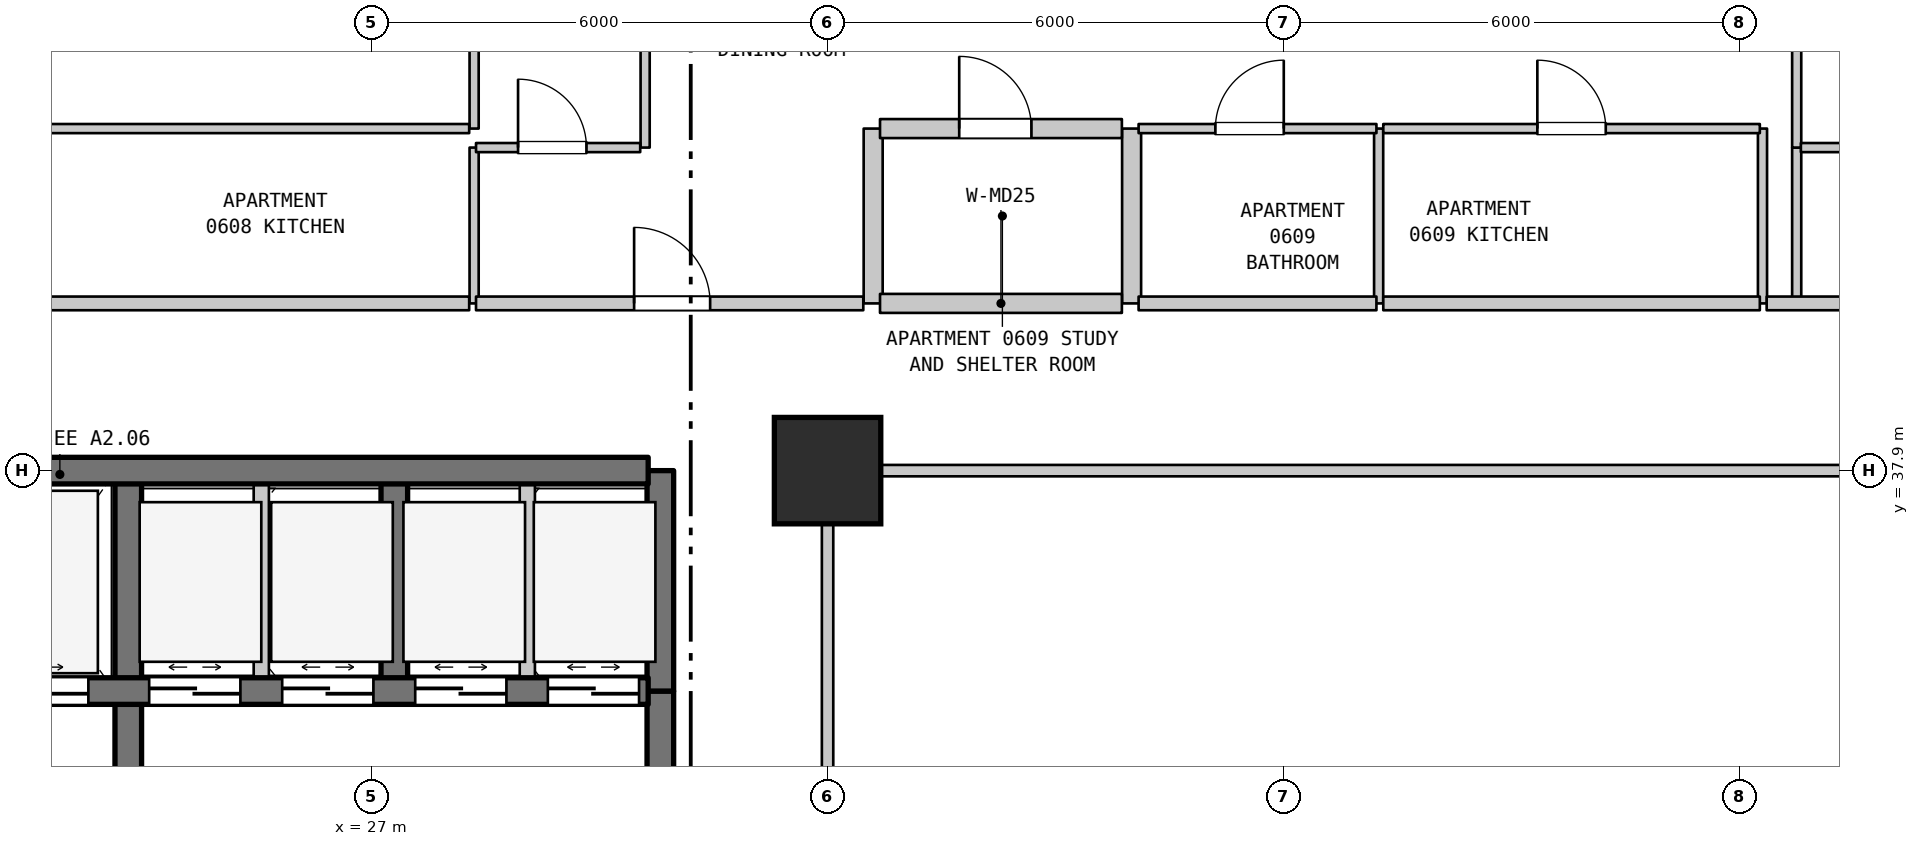
"""IFC4 building model, lengths in metres.
Left out: names, types, materials, properties, quantities, classifications, styles, units other than length and angle.
Written with IfcOpenShell. Run it as: python <this file> out.ifc"""

import sys

from ifc_helpers import new_model, si_unit, direction, frame, frame_2d, origin, origin_2d, place, context, subcontext, project, spatial, rectangle, extrude, element, fill, save


model = new_model("IFC4")
c1 = context("Model", 3, precision=1e-05, world=origin(), true_north=direction((0.0, 1.0)))
c2 = subcontext(c1, "Body", "Model", "MODEL_VIEW")
j1 = project(units=[si_unit("LENGTHUNIT", "METRE"), si_unit("PLANEANGLEUNIT", "RADIAN")], contexts=[c1])
p1 = place(None, origin())
s1 = spatial("IfcSite", under=j1, at=p1, CompositionType="ELEMENT")
p2 = place(p1, origin())
s2 = spatial("IfcBuilding", under=s1, at=p2, CompositionType="ELEMENT")
p3 = place(p2, frame((0.0, 0.0, 31.4)))
s3 = spatial("IfcBuildingStorey", under=s2, at=p3, CompositionType="ELEMENT", Elevation=31.4)
p4 = place(p3, frame((33.0, 37.9, 0.0), z_axis=(0.0, 0.0, 1.0), x_axis=(1.0, 0.0, 0.0)))
e1 = element("IfcColumn", 1, at=p4, inside=s3, PredefinedType="COLUMN", context=c2, shape_type="SweptSolid", body=[
    extrude(rectangle(XDim=1.4, YDim=1.4, at=origin_2d()), origin(), (0.0, 0.0, 1.0), 3.7),
])
p5 = place(p3, frame((23.8, 31.5, 0.0), z_axis=(0.0, 0.0, 1.0), x_axis=(0.0, 1.0, 0.0)))
e2 = element("IfcWall", 2, at=p5, inside=s3, PredefinedType="SHEAR", context=c2, shape_type="SweptSolid", body=[
    extrude(rectangle(XDim=3.5, YDim=0.35, at=frame_2d((1.75, 0.0))), origin(), (0.0, 0.0, 1.0), 3.385),
])
p6 = place(p5, frame((1.127, 0.0, 0.0)))
e3 = element("IfcOpeningElement", 3, at=p6, cuts=e2, PredefinedType="OPENING", context=c2, shape_type="SweptSolid", body=[
    extrude(rectangle(XDim=1.1, YDim=2.15, at=frame_2d((0.55, 1.075))), frame((0.0, 0.185, 0.0), z_axis=(0.0, -1.0, 0.0), x_axis=(1.0, 0.0, 0.0)), (0.0, 0.0, 1.0), 0.37),
])
p7 = place(p3, frame((23.8, 35.0, 0.0), z_axis=(0.0, 0.0, 1.0), x_axis=(0.0, 1.0, 0.0)))
e4 = element("IfcWall", 4, at=p7, inside=s3, PredefinedType="SHEAR", context=c2, shape_type="SweptSolid", body=[
    extrude(rectangle(XDim=2.9, YDim=0.35, at=frame_2d((1.45, 0.0))), origin(), (0.0, 0.0, 1.0), 3.385),
])
p8 = place(p3, frame((25.55, 35.0, 0.0), z_axis=(0.0, 0.0, 1.0), x_axis=(0.0, 1.0, 0.0)))
e5 = element("IfcWall", 5, at=p8, inside=s3, PredefinedType="STANDARD", context=c2, shape_type="SweptSolid", body=[
    extrude(rectangle(XDim=2.9, YDim=0.2, at=frame_2d((1.45, 0.0))), origin(), (0.0, 0.0, 1.0), 3.385),
])
p9 = place(p3, frame((27.3, 35.0, 0.0), z_axis=(0.0, 0.0, 1.0), x_axis=(0.0, 1.0, 0.0)))
e6 = element("IfcWall", 6, at=p9, inside=s3, PredefinedType="SHEAR", context=c2, shape_type="SweptSolid", body=[
    extrude(rectangle(XDim=2.9, YDim=0.35, at=frame_2d((1.45, 0.0))), origin(), (0.0, 0.0, 1.0), 3.385),
])
p10 = place(p3, frame((28.35, 40.1, 0.0), z_axis=(0.0, 0.0, 1.0), x_axis=(0.0, 1.0, 0.0)))
e7 = element("IfcWall", 7, at=p10, inside=s3, PredefinedType="PARTITIONING", context=c2, shape_type="SweptSolid", body=[
    extrude(rectangle(XDim=2.05, YDim=0.12, at=frame_2d((1.025, 0.0))), origin(), (0.0, 0.0, 1.0), 3.385),
])
p11 = place(p3, frame((28.35, 42.4, 0.0), z_axis=(0.0, 0.0, 1.0), x_axis=(0.0, 1.0, 0.0)))
e8 = element("IfcWall", 8, at=p11, inside=s3, PredefinedType="PARTITIONING", context=c2, shape_type="SweptSolid", body=[
    extrude(rectangle(XDim=2.7, YDim=0.12, at=frame_2d((1.35, 0.0))), origin(), (0.0, 0.0, 1.0), 3.385),
])
p12 = place(p3, frame((29.05, 35.0, 0.0), z_axis=(0.0, 0.0, 1.0), x_axis=(0.0, 1.0, 0.0)))
e9 = element("IfcWall", 9, at=p12, inside=s3, PredefinedType="STANDARD", context=c2, shape_type="SweptSolid", body=[
    extrude(rectangle(XDim=2.9, YDim=0.2, at=frame_2d((1.45, 0.0))), origin(), (0.0, 0.0, 1.0), 3.385),
])
p13 = place(p3, frame((30.6, 42.15, 0.0), z_axis=(0.0, 0.0, 1.0), x_axis=(0.0, 1.0, 0.0)))
e10 = element("IfcWall", 10, at=p13, inside=s3, PredefinedType="PARTITIONING", context=c2, shape_type="SweptSolid", body=[
    extrude(rectangle(XDim=11.74, YDim=0.12, at=frame_2d((5.87, 0.0))), origin(), (0.0, 0.0, 1.0), 3.385),
])
p14 = place(p3, frame((30.8, 31.5, 0.0), z_axis=(0.0, 0.0, 1.0), x_axis=(0.0, 1.0, 0.0)))
e11 = element("IfcWall", 11, at=p14, inside=s3, PredefinedType="SHEAR", context=c2, shape_type="SweptSolid", body=[
    extrude(rectangle(XDim=3.5, YDim=0.35, at=frame_2d((1.75, 0.0))), origin(), (0.0, 0.0, 1.0), 3.385),
])
p15 = place(p14, frame((1.15, 0.0, 0.0)))
e12 = element("IfcOpeningElement", 12, at=p15, cuts=e11, PredefinedType="OPENING", context=c2, shape_type="SweptSolid", body=[
    extrude(rectangle(XDim=1.2, YDim=2.2, at=frame_2d((0.6, 1.1))), frame((0.0, 0.185, 0.0), z_axis=(0.0, -1.0, 0.0), x_axis=(1.0, 0.0, 0.0)), (0.0, 0.0, 1.0), 0.37),
])
p16 = place(p3, frame((30.8, 35.0, 0.0), z_axis=(0.0, 0.0, 1.0), x_axis=(0.0, 1.0, 0.0)))
e13 = element("IfcWall", 13, at=p16, inside=s3, PredefinedType="SHEAR", context=c2, shape_type="SweptSolid", body=[
    extrude(rectangle(XDim=2.9, YDim=0.35, at=frame_2d((1.45, 0.0))), origin(), (0.0, 0.0, 1.0), 3.385),
])
p17 = place(p3, frame((33.0, 27.91, 0.0), z_axis=(0.0, 0.0, 1.0), x_axis=(0.0, 1.0, 0.0)))
e14 = element("IfcWall", 14, at=p17, inside=s3, PredefinedType="STANDARD", context=c2, shape_type="SweptSolid", body=[
    extrude(rectangle(XDim=9.98, YDim=0.15, at=frame_2d((4.99, 0.0))), origin(), (0.0, 0.0, 1.0), 2.885),
])
for number, where, z_axis, x_axis in (
    (15, (33.6, 40.1, 0.0), (0.0, 0.0, 1.0), (0.0, 1.0, 0.0)),
    (16, (37.0, 40.1, 0.0), (0.0, 0.0, 1.0), (0.0, 1.0, 0.0)),
):
    element("IfcWall", number, at=place(p3, frame(where, z_axis=z_axis, x_axis=x_axis)), inside=s3, PredefinedType="STANDARD", context=c2, shape_type="SweptSolid", body=[
        extrude(rectangle(XDim=2.3, YDim=0.25, at=frame_2d((1.15, 0.0))), origin(), (0.0, 0.0, 1.0), 3.385),
    ])
for number, where, z_axis, x_axis in (
    (17, (40.25, 40.1, 0.0), (0.0, 0.0, 1.0), (0.0, 1.0, 0.0)),
    (18, (45.3, 40.1, 0.0), (0.0, 0.0, 1.0), (0.0, 1.0, 0.0)),
):
    element("IfcWall", number, at=place(p3, frame(where, z_axis=z_axis, x_axis=x_axis)), inside=s3, PredefinedType="PARTITIONING", context=c2, shape_type="SweptSolid", body=[
        extrude(rectangle(XDim=2.3, YDim=0.12, at=frame_2d((1.15, 0.0))), origin(), (0.0, 0.0, 1.0), 3.385),
    ])
p18 = place(p3, frame((45.75, 40.1, 0.0), z_axis=(0.0, 0.0, 1.0), x_axis=(0.0, 1.0, 0.0)))
e19 = element("IfcWall", 19, at=p18, inside=s3, PredefinedType="PARTITIONING", context=c2, shape_type="SweptSolid", body=[
    extrude(rectangle(XDim=2.05, YDim=0.12, at=frame_2d((1.025, 0.0))), origin(), (0.0, 0.0, 1.0), 3.385),
])
p19 = place(p3, frame((45.75, 42.15, 0.0), z_axis=(0.0, 0.0, 1.0), x_axis=(0.0, 1.0, 0.0)))
e20 = element("IfcWall", 20, at=p19, inside=s3, PredefinedType="PARTITIONING", context=c2, shape_type="SweptSolid", body=[
    extrude(rectangle(XDim=3.3, YDim=0.12, at=frame_2d((1.65, 0.0))), origin(), (0.0, 0.0, 1.0), 3.385),
])
p20 = place(p3, frame((19.16, 35.0, 0.0), z_axis=(0.0, 0.0, 1.0), x_axis=(1.0, 0.0, 0.0)))
e21 = element("IfcWall", 21, at=p20, inside=s3, PredefinedType="SHEAR", context=c2, shape_type="SweptSolid", body=[
    extrude(rectangle(XDim=11.48, YDim=0.35, at=frame_2d((5.74, 0.0))), origin(), (0.0, 0.0, 1.0), 3.385),
])
p21 = place(p20, frame((0.365, 0.0, 0.0)))
e22 = element("IfcOpeningElement", 22, at=p21, cuts=e21, PredefinedType="OPENING", context=c2, shape_type="SweptSolid", body=[
    extrude(rectangle(XDim=1.35, YDim=2.2, at=frame_2d((0.675, 1.1))), frame((0.0, 0.185, 0.0), z_axis=(0.0, -1.0, 0.0), x_axis=(1.0, 0.0, 0.0)), (0.0, 0.0, 1.0), 0.37),
])
p22 = place(p20, frame((2.765, 0.0, 0.0)))
e23 = element("IfcOpeningElement", 23, at=p22, cuts=e21, PredefinedType="OPENING", context=c2, shape_type="SweptSolid", body=[
    extrude(rectangle(XDim=1.35, YDim=2.2, at=frame_2d((0.675, 1.1))), frame((0.0, 0.185, 0.0), z_axis=(0.0, -1.0, 0.0), x_axis=(1.0, 0.0, 0.0)), (0.0, 0.0, 1.0), 0.37),
])
p23 = place(p20, frame((4.915, 0.0, 0.0)))
e24 = element("IfcOpeningElement", 24, at=p23, cuts=e21, PredefinedType="OPENING", context=c2, shape_type="SweptSolid", body=[
    extrude(rectangle(XDim=1.2, YDim=2.2, at=frame_2d((0.6, 1.1))), frame((0.0, 0.185, 0.0), z_axis=(0.0, -1.0, 0.0), x_axis=(1.0, 0.0, 0.0)), (0.0, 0.0, 1.0), 0.37),
])
p24 = place(p20, frame((6.665, 0.0, 0.0)))
e25 = element("IfcOpeningElement", 25, at=p24, cuts=e21, PredefinedType="OPENING", context=c2, shape_type="SweptSolid", body=[
    extrude(rectangle(XDim=1.2, YDim=2.2, at=frame_2d((0.6, 1.1))), frame((0.0, 0.185, 0.0), z_axis=(0.0, -1.0, 0.0), x_axis=(1.0, 0.0, 0.0)), (0.0, 0.0, 1.0), 0.37),
])
p25 = place(p20, frame((8.415, 0.0, 0.0)))
e26 = element("IfcOpeningElement", 26, at=p25, cuts=e21, PredefinedType="OPENING", context=c2, shape_type="SweptSolid", body=[
    extrude(rectangle(XDim=1.2, YDim=2.2, at=frame_2d((0.6, 1.1))), frame((0.0, 0.185, 0.0), z_axis=(0.0, -1.0, 0.0), x_axis=(1.0, 0.0, 0.0)), (0.0, 0.0, 1.0), 0.37),
])
p26 = place(p20, frame((10.16, 0.0, 0.0)))
e27 = element("IfcOpeningElement", 27, at=p26, cuts=e21, PredefinedType="OPENING", context=c2, shape_type="SweptSolid", body=[
    extrude(rectangle(XDim=1.2, YDim=2.2, at=frame_2d((0.6, 1.1))), frame((0.0, 0.185, 0.0), z_axis=(0.0, -1.0, 0.0), x_axis=(1.0, 0.0, 0.0)), (0.0, 0.0, 1.0), 0.37),
])
p27 = place(p3, frame((19.16, 37.9, 0.0), z_axis=(0.0, 0.0, 1.0), x_axis=(1.0, 0.0, 0.0)))
e28 = element("IfcWall", 28, at=p27, inside=s3, PredefinedType="SHEAR", context=c2, shape_type="SweptSolid", body=[
    extrude(rectangle(XDim=11.48, YDim=0.35, at=frame_2d((5.74, 0.0))), origin(), (0.0, 0.0, 1.0), 3.385),
])
p28 = place(p3, frame((33.07, 37.9, 0.0), z_axis=(0.0, 0.0, 1.0), x_axis=(1.0, 0.0, 0.0)))
e29 = element("IfcWall", 29, at=p28, inside=s3, PredefinedType="STANDARD", context=c2, shape_type="SweptSolid", body=[
    extrude(rectangle(XDim=26.935, YDim=0.15, at=frame_2d((13.467, 0.0))), origin(), (0.0, 0.0, 1.0), 3.385),
])
p29 = place(p3, frame((22.695, 40.1, 0.0), z_axis=(0.0, 0.0, 1.0), x_axis=(1.0, 0.0, 0.0)))
e30 = element("IfcWall", 30, at=p29, inside=s3, PredefinedType="STANDARD", context=c2, shape_type="SweptSolid", body=[
    extrude(rectangle(XDim=5.59, YDim=0.18, at=frame_2d((2.795, 0.0))), origin(), (0.0, 0.0, 1.0), 3.385),
])
p30 = place(p3, frame((28.375, 40.1, 0.0), z_axis=(0.0, 0.0, 1.0), x_axis=(1.0, 0.0, 0.0)))
e31 = element("IfcWall", 31, at=p30, inside=s3, PredefinedType="STANDARD", context=c2, shape_type="SweptSolid", body=[
    extrude(rectangle(XDim=5.095, YDim=0.18, at=frame_2d((2.547, 0.0))), origin(), (0.0, 0.0, 1.0), 3.385),
])
p31 = place(p30, frame((2.08, 0.0, 0.0)))
e32 = element("IfcOpeningElement", 32, at=p31, cuts=e31, PredefinedType="OPENING", context=c2, shape_type="SweptSolid", body=[
    extrude(rectangle(XDim=1.0, YDim=2.15, at=frame_2d((0.5, 1.075))), frame((0.0, 0.1, 0.0), z_axis=(0.0, -1.0, 0.0), x_axis=(1.0, 0.0, 0.0)), (0.0, 0.0, 1.0), 0.2),
])
p32 = place(p3, frame((33.69, 40.1, 0.0), z_axis=(0.0, 0.0, 1.0), x_axis=(1.0, 0.0, 0.0)))
e33 = element("IfcWall", 33, at=p32, inside=s3, PredefinedType="STANDARD", context=c2, shape_type="SweptSolid", body=[
    extrude(rectangle(XDim=3.182, YDim=0.25, at=frame_2d((1.591, 0.0))), origin(), (0.0, 0.0, 1.0), 3.385),
])
p33 = place(p3, frame((37.092, 40.1, 0.0), z_axis=(0.0, 0.0, 1.0), x_axis=(1.0, 0.0, 0.0)))
e34 = element("IfcWall", 34, at=p33, inside=s3, PredefinedType="STANDARD", context=c2, shape_type="SweptSolid", body=[
    extrude(rectangle(XDim=3.129, YDim=0.18, at=frame_2d((1.564, 0.0))), origin(), (0.0, 0.0, 1.0), 3.385),
])
p34 = place(p3, frame((40.311, 40.1, 0.0), z_axis=(0.0, 0.0, 1.0), x_axis=(1.0, 0.0, 0.0)))
e35 = element("IfcWall", 35, at=p34, inside=s3, PredefinedType="STANDARD", context=c2, shape_type="SweptSolid", body=[
    extrude(rectangle(XDim=4.954, YDim=0.18, at=frame_2d((2.477, 0.0))), origin(), (0.0, 0.0, 1.0), 3.385),
])
p35 = place(p3, frame((45.355, 40.1, 0.0), z_axis=(0.0, 0.0, 1.0), x_axis=(1.0, 0.0, 0.0)))
e36 = element("IfcWall", 36, at=p35, inside=s3, PredefinedType="STANDARD", context=c2, shape_type="SweptSolid", body=[
    extrude(rectangle(XDim=5.61, YDim=0.18, at=frame_2d((2.805, 0.0))), origin(), (0.0, 0.0, 1.0), 3.385),
])
p36 = place(p35, frame((2.435, 0.0, 0.0)))
e37 = element("IfcOpeningElement", 37, at=p36, cuts=e36, PredefinedType="OPENING", context=c2, shape_type="SweptSolid", body=[
    extrude(rectangle(XDim=1.0, YDim=2.15, at=frame_2d((0.5, 1.075))), frame((0.0, 0.1, 0.0), z_axis=(0.0, -1.0, 0.0), x_axis=(1.0, 0.0, 0.0)), (0.0, 0.0, 1.0), 0.2),
])
p37 = place(p3, frame((28.375, 42.15, 0.0), z_axis=(0.0, 0.0, 1.0), x_axis=(1.0, 0.0, 0.0)))
e38 = element("IfcWall", 38, at=p37, inside=s3, PredefinedType="PARTITIONING", context=c2, shape_type="SweptSolid", body=[
    extrude(rectangle(XDim=2.16, YDim=0.12, at=frame_2d((1.08, 0.0))), origin(), (0.0, 0.0, 1.0), 3.385),
])
p38 = place(p37, frame((0.553, 0.0, 0.0)))
e39 = element("IfcOpeningElement", 39, at=p38, cuts=e38, PredefinedType="OPENING", context=c2, shape_type="SweptSolid", body=[
    extrude(rectangle(XDim=0.9, YDim=2.15, at=frame_2d((0.45, 1.075))), frame((0.0, 0.07, 0.0), z_axis=(0.0, -1.0, 0.0), x_axis=(1.0, 0.0, 0.0)), (0.0, 0.0, 1.0), 0.14),
])
p39 = place(p3, frame((45.805, 42.15, 0.0), z_axis=(0.0, 0.0, 1.0), x_axis=(1.0, 0.0, 0.0)))
e40 = element("IfcWall", 40, at=p39, inside=s3, PredefinedType="PARTITIONING", context=c2, shape_type="SweptSolid", body=[
    extrude(rectangle(XDim=2.16, YDim=0.12, at=frame_2d((1.08, 0.0))), origin(), (0.0, 0.0, 1.0), 3.385),
])
p40 = place(p39, frame((0.553, 0.0, 0.0)))
e41 = element("IfcOpeningElement", 41, at=p40, cuts=e40, PredefinedType="OPENING", context=c2, shape_type="SweptSolid", body=[
    extrude(rectangle(XDim=0.9, YDim=2.15, at=frame_2d((0.45, 1.075))), frame((0.0, 0.07, 0.0), z_axis=(0.0, -1.0, 0.0), x_axis=(1.0, 0.0, 0.0)), (0.0, 0.0, 1.0), 0.14),
])
p41 = place(p3, frame((22.695, 42.4, 0.0), z_axis=(0.0, 0.0, 1.0), x_axis=(1.0, 0.0, 0.0)))
e42 = element("IfcWall", 42, at=p41, inside=s3, PredefinedType="PARTITIONING", context=c2, shape_type="SweptSolid", body=[
    extrude(rectangle(XDim=5.59, YDim=0.12, at=frame_2d((2.795, 0.0))), origin(), (0.0, 0.0, 1.0), 3.385),
])
p42 = place(p3, frame((33.69, 42.4, 0.0), z_axis=(0.0, 0.0, 1.0), x_axis=(1.0, 0.0, 0.0)))
e43 = element("IfcWall", 43, at=p42, inside=s3, PredefinedType="STANDARD", context=c2, shape_type="SweptSolid", body=[
    extrude(rectangle(XDim=3.182, YDim=0.25, at=frame_2d((1.591, 0.0))), origin(), (0.0, 0.0, 1.0), 3.385),
])
p43 = place(p42, frame((1.042, 0.0, 0.0)))
e44 = element("IfcOpeningElement", 44, at=p43, cuts=e43, PredefinedType="OPENING", context=c2, shape_type="SweptSolid", body=[
    extrude(rectangle(XDim=0.95, YDim=2.15, at=frame_2d((0.475, 1.075))), frame((0.0, 0.135, 0.0), z_axis=(0.0, -1.0, 0.0), x_axis=(1.0, 0.0, 0.0)), (0.0, 0.0, 1.0), 0.27),
])
p44 = place(p3, frame((37.092, 42.4, 0.0), z_axis=(0.0, 0.0, 1.0), x_axis=(1.0, 0.0, 0.0)))
e45 = element("IfcWall", 45, at=p44, inside=s3, PredefinedType="PARTITIONING", context=c2, shape_type="SweptSolid", body=[
    extrude(rectangle(XDim=3.129, YDim=0.12, at=frame_2d((1.564, 0.0))), origin(), (0.0, 0.0, 1.0), 3.385),
])
p45 = place(p44, frame((1.01, 0.0, 0.0)))
e46 = element("IfcOpeningElement", 46, at=p45, cuts=e45, PredefinedType="OPENING", context=c2, shape_type="SweptSolid", body=[
    extrude(rectangle(XDim=0.9, YDim=2.1, at=frame_2d((0.45, 1.05))), frame((0.0, 0.07, 0.0), z_axis=(0.0, -1.0, 0.0), x_axis=(1.0, 0.0, 0.0)), (0.0, 0.0, 1.0), 0.14),
])
p46 = place(p3, frame((40.311, 42.4, 0.0), z_axis=(0.0, 0.0, 1.0), x_axis=(1.0, 0.0, 0.0)))
e47 = element("IfcWall", 47, at=p46, inside=s3, PredefinedType="PARTITIONING", context=c2, shape_type="SweptSolid", body=[
    extrude(rectangle(XDim=4.954, YDim=0.12, at=frame_2d((2.477, 0.0))), origin(), (0.0, 0.0, 1.0), 3.385),
])
p47 = place(p46, frame((2.027, 0.0, 0.0)))
e48 = element("IfcOpeningElement", 48, at=p47, cuts=e47, PredefinedType="OPENING", context=c2, shape_type="SweptSolid", body=[
    extrude(rectangle(XDim=0.9, YDim=2.15, at=frame_2d((0.45, 1.075))), frame((0.0, 0.07, 0.0), z_axis=(0.0, -1.0, 0.0), x_axis=(1.0, 0.0, 0.0)), (0.0, 0.0, 1.0), 0.14),
])
p48 = place(p22, origin())
e49 = element("IfcDoor", 49, at=p48, inside=s3, OperationType="DOUBLE_DOOR_SLIDING", PredefinedType="DOOR", context=c2, shape_type="SweptSolid", body=[
    extrude(rectangle(XDim=1.35, YDim=2.2, at=frame_2d((0.675, 1.1))), frame((0.0, 0.025, 0.0), z_axis=(0.0, -1.0, 0.0), x_axis=(1.0, 0.0, 0.0)), (0.0, 0.0, 1.0), 0.05),
])
fill(e23, e49)
p49 = place(p23, origin())
e50 = element("IfcDoor", 50, at=p49, inside=s3, OperationType="DOUBLE_DOOR_SLIDING", PredefinedType="DOOR", context=c2, shape_type="SweptSolid", body=[
    extrude(rectangle(XDim=1.2, YDim=2.2, at=frame_2d((0.6, 1.1))), frame((0.0, 0.025, 0.0), z_axis=(0.0, -1.0, 0.0), x_axis=(1.0, 0.0, 0.0)), (0.0, 0.0, 1.0), 0.05),
])
fill(e24, e50)
p50 = place(p24, origin())
e51 = element("IfcDoor", 51, at=p50, inside=s3, OperationType="DOUBLE_DOOR_SLIDING", PredefinedType="DOOR", context=c2, shape_type="SweptSolid", body=[
    extrude(rectangle(XDim=1.2, YDim=2.2, at=frame_2d((0.6, 1.1))), frame((0.0, 0.025, 0.0), z_axis=(0.0, -1.0, 0.0), x_axis=(1.0, 0.0, 0.0)), (0.0, 0.0, 1.0), 0.05),
])
fill(e25, e51)
p51 = place(p25, origin())
e52 = element("IfcDoor", 52, at=p51, inside=s3, OperationType="DOUBLE_DOOR_SLIDING", PredefinedType="DOOR", context=c2, shape_type="SweptSolid", body=[
    extrude(rectangle(XDim=1.2, YDim=2.2, at=frame_2d((0.6, 1.1))), frame((0.0, 0.025, 0.0), z_axis=(0.0, -1.0, 0.0), x_axis=(1.0, 0.0, 0.0)), (0.0, 0.0, 1.0), 0.05),
])
fill(e26, e52)
p52 = place(p26, origin())
e53 = element("IfcDoor", 53, at=p52, inside=s3, OperationType="DOUBLE_DOOR_SLIDING", PredefinedType="DOOR", context=c2, shape_type="SweptSolid", body=[
    extrude(rectangle(XDim=1.2, YDim=2.2, at=frame_2d((0.6, 1.1))), frame((0.0, 0.025, 0.0), z_axis=(0.0, -1.0, 0.0), x_axis=(1.0, 0.0, 0.0)), (0.0, 0.0, 1.0), 0.05),
])
fill(e27, e53)
p53 = place(p31, origin())
e54 = element("IfcDoor", 54, at=p53, inside=s3, OperationType="SINGLE_SWING_LEFT", PredefinedType="DOOR", context=c2, shape_type="SweptSolid", body=[
    extrude(rectangle(XDim=1.0, YDim=2.15, at=frame_2d((0.5, 1.075))), frame((0.0, 0.025, 0.0), z_axis=(0.0, -1.0, 0.0), x_axis=(1.0, 0.0, 0.0)), (0.0, 0.0, 1.0), 0.05),
])
fill(e32, e54)
p54 = place(p38, origin())
e55 = element("IfcDoor", 55, at=p54, inside=s3, OperationType="SINGLE_SWING_LEFT", PredefinedType="DOOR", context=c2, shape_type="SweptSolid", body=[
    extrude(rectangle(XDim=0.9, YDim=2.15, at=frame_2d((0.45, 1.075))), frame((0.0, 0.025, 0.0), z_axis=(0.0, -1.0, 0.0), x_axis=(1.0, 0.0, 0.0)), (0.0, 0.0, 1.0), 0.05),
])
fill(e39, e55)
p55 = place(p43, origin())
e56 = element("IfcDoor", 56, at=p55, inside=s3, OperationType="SINGLE_SWING_LEFT", PredefinedType="DOOR", context=c2, shape_type="SweptSolid", body=[
    extrude(rectangle(XDim=0.95, YDim=2.15, at=frame_2d((0.475, 1.075))), frame((0.0, 0.025, 0.0), z_axis=(0.0, -1.0, 0.0), x_axis=(1.0, 0.0, 0.0)), (0.0, 0.0, 1.0), 0.05),
])
fill(e44, e56)
p56 = place(p45, origin())
e57 = element("IfcDoor", 57, at=p56, inside=s3, OperationType="SINGLE_SWING_RIGHT", PredefinedType="DOOR", context=c2, shape_type="SweptSolid", body=[
    extrude(rectangle(XDim=0.9, YDim=2.1, at=frame_2d((0.45, 1.05))), frame((0.0, 0.025, 0.0), z_axis=(0.0, -1.0, 0.0), x_axis=(1.0, 0.0, 0.0)), (0.0, 0.0, 1.0), 0.05),
])
fill(e46, e57)
p57 = place(p47, origin())
e58 = element("IfcDoor", 58, at=p57, inside=s3, OperationType="SINGLE_SWING_LEFT", PredefinedType="DOOR", context=c2, shape_type="SweptSolid", body=[
    extrude(rectangle(XDim=0.9, YDim=2.15, at=frame_2d((0.45, 1.075))), frame((0.0, 0.025, 0.0), z_axis=(0.0, -1.0, 0.0), x_axis=(1.0, 0.0, 0.0)), (0.0, 0.0, 1.0), 0.05),
])
fill(e48, e58)
save(model, sys.argv[1])
